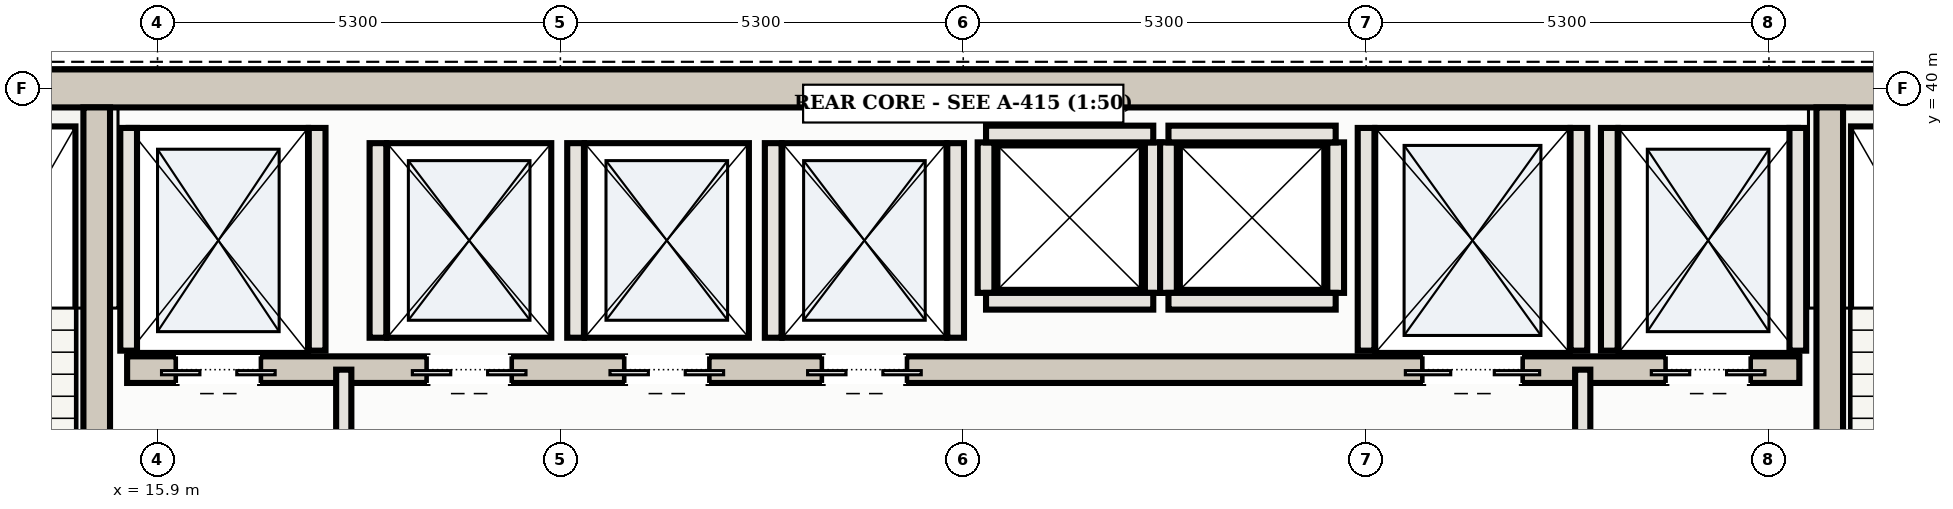
"""IFC4 building model, lengths in metres.
Left out: names, types, materials, properties, quantities, classifications, styles, units other than length and angle.
Written with IfcOpenShell. Run it as: python <this file> out.ifc"""

import sys

from ifc_helpers import new_model, si_unit, direction, frame, frame_2d, origin, place, context, subcontext, project, spatial, rectangle, extrude, element, fill, save


model = new_model("IFC4")
c1 = context("Model", 3, precision=1e-05, world=origin(), true_north=direction((0.0, 1.0)))
c2 = subcontext(c1, "Body", "Model", "MODEL_VIEW")
j1 = project(units=[si_unit("LENGTHUNIT", "METRE"), si_unit("PLANEANGLEUNIT", "RADIAN")], contexts=[c1])
p1 = place(None, origin())
s1 = spatial("IfcSite", under=j1, at=p1, CompositionType="ELEMENT")
p2 = place(p1, origin())
s2 = spatial("IfcBuilding", under=s1, at=p2, CompositionType="ELEMENT")
p3 = place(p2, frame((0.0, 0.0, 266.0)))
s3 = spatial("IfcBuildingStorey", under=s2, at=p3, CompositionType="ELEMENT", Elevation=266.0)
p4 = place(p3, frame((10.35, 40.0, 0.0), z_axis=(0.0, 0.0, 1.0), x_axis=(1.0, 0.0, 0.0)))
e1 = element("IfcWall", 1, at=p4, inside=s3, PredefinedType="SHEAR", context=c2, shape_type="SweptSolid", body=[
    extrude(rectangle(XDim=32.3, YDim=0.5, at=frame_2d((16.15, 0.0))), origin(), (0.0, 0.0, 1.0), 4.52),
])
p5 = place(p3, frame((15.1, 31.1, 0.0), z_axis=(0.0, 0.0, 1.0), x_axis=(0.0, 1.0, 0.0)))
e2 = element("IfcWall", 2, at=p5, inside=s3, PredefinedType="SHEAR", context=c2, shape_type="SweptSolid", body=[
    extrude(rectangle(XDim=8.65, YDim=0.35, at=frame_2d((4.325, 0.0))), origin(), (0.0, 0.0, 1.0), 4.52),
])
p6 = place(p5, frame((0.51, 0.0, 0.0)))
e3 = element("IfcOpeningElement", 3, at=p6, cuts=e2, PredefinedType="OPENING", context=c2, shape_type="SweptSolid", body=[
    extrude(rectangle(XDim=1.15, YDim=2.2, at=frame_2d((0.575, 1.1))), frame((0.0, 0.185, 0.0), z_axis=(0.0, -1.0, 0.0), x_axis=(1.0, 0.0, 0.0)), (0.0, 0.0, 1.0), 0.37),
])
p7 = place(p3, frame((37.9, 31.1, 0.0), z_axis=(0.0, 0.0, 1.0), x_axis=(0.0, 1.0, 0.0)))
e4 = element("IfcWall", 4, at=p7, inside=s3, PredefinedType="SHEAR", context=c2, shape_type="SweptSolid", body=[
    extrude(rectangle(XDim=8.65, YDim=0.35, at=frame_2d((4.325, 0.0))), origin(), (0.0, 0.0, 1.0), 4.52),
])
p8 = place(p7, frame((0.51, 0.0, 0.0)))
e5 = element("IfcOpeningElement", 5, at=p8, cuts=e4, PredefinedType="OPENING", context=c2, shape_type="SweptSolid", body=[
    extrude(rectangle(XDim=1.15, YDim=2.2, at=frame_2d((0.575, 1.1))), frame((0.0, 0.185, 0.0), z_axis=(0.0, -1.0, 0.0), x_axis=(1.0, 0.0, 0.0)), (0.0, 0.0, 1.0), 0.37),
])
p9 = place(p3, frame((15.5, 36.3, 0.0), z_axis=(0.0, 0.0, 1.0), x_axis=(1.0, 0.0, 0.0)))
e6 = element("IfcWall", 6, at=p9, inside=s3, PredefinedType="SHEAR", context=c2, shape_type="SweptSolid", body=[
    extrude(rectangle(XDim=22.0, YDim=0.35, at=frame_2d((11.0, 0.0))), origin(), (0.0, 0.0, 1.0), 4.52),
])
p10 = place(p9, frame((0.65, 0.0, 0.0)))
e7 = element("IfcOpeningElement", 7, at=p10, cuts=e6, PredefinedType="OPENING", context=c2, shape_type="SweptSolid", body=[
    extrude(rectangle(XDim=1.1, YDim=2.15, at=frame_2d((0.55, 1.075))), frame((0.0, 0.185, 0.0), z_axis=(0.0, -1.0, 0.0), x_axis=(1.0, 0.0, 0.0)), (0.0, 0.0, 1.0), 0.37),
])
p11 = place(p9, frame((20.25, 0.0, 0.0)))
e8 = element("IfcOpeningElement", 8, at=p11, cuts=e6, PredefinedType="OPENING", context=c2, shape_type="SweptSolid", body=[
    extrude(rectangle(XDim=1.1, YDim=2.15, at=frame_2d((0.55, 1.075))), frame((0.0, 0.185, 0.0), z_axis=(0.0, -1.0, 0.0), x_axis=(1.0, 0.0, 0.0)), (0.0, 0.0, 1.0), 0.37),
])
p12 = place(p9, frame((17.05, 0.0, 0.0)))
e9 = element("IfcOpeningElement", 9, at=p12, cuts=e6, PredefinedType="OPENING", context=c2, shape_type="SweptSolid", body=[
    extrude(rectangle(XDim=1.3, YDim=2.2, at=frame_2d((0.65, 1.1))), frame((0.0, 0.185, 0.0), z_axis=(0.0, -1.0, 0.0), x_axis=(1.0, 0.0, 0.0)), (0.0, 0.0, 1.0), 0.37),
])
p13 = place(p9, frame((3.95, 0.0, 0.0)))
e10 = element("IfcOpeningElement", 10, at=p13, cuts=e6, PredefinedType="OPENING", context=c2, shape_type="SweptSolid", body=[
    extrude(rectangle(XDim=1.1, YDim=2.15, at=frame_2d((0.55, 1.075))), frame((0.0, 0.185, 0.0), z_axis=(0.0, -1.0, 0.0), x_axis=(1.0, 0.0, 0.0)), (0.0, 0.0, 1.0), 0.37),
])
p14 = place(p9, frame((6.55, 0.0, 0.0)))
e11 = element("IfcOpeningElement", 11, at=p14, cuts=e6, PredefinedType="OPENING", context=c2, shape_type="SweptSolid", body=[
    extrude(rectangle(XDim=1.1, YDim=2.15, at=frame_2d((0.55, 1.075))), frame((0.0, 0.185, 0.0), z_axis=(0.0, -1.0, 0.0), x_axis=(1.0, 0.0, 0.0)), (0.0, 0.0, 1.0), 0.37),
])
p15 = place(p9, frame((9.15, 0.0, 0.0)))
e12 = element("IfcOpeningElement", 12, at=p15, cuts=e6, PredefinedType="OPENING", context=c2, shape_type="SweptSolid", body=[
    extrude(rectangle(XDim=1.1, YDim=2.15, at=frame_2d((0.55, 1.075))), frame((0.0, 0.185, 0.0), z_axis=(0.0, -1.0, 0.0), x_axis=(1.0, 0.0, 0.0)), (0.0, 0.0, 1.0), 0.37),
])
for number, where, z_axis, x_axis in (
    (13, (15.52, 36.55, 0.0), (0.0, 0.0, 1.0), (0.0, 1.0, 0.0)),
    (14, (18.0, 36.55, 0.0), (0.0, 0.0, 1.0), (0.0, 1.0, 0.0)),
    (15, (35.0, 36.55, 0.0), (0.0, 0.0, 1.0), (0.0, 1.0, 0.0)),
    (16, (37.48, 36.55, 0.0), (0.0, 0.0, 1.0), (0.0, 1.0, 0.0)),
    (17, (31.8, 36.55, 0.0), (0.0, 0.0, 1.0), (0.0, 1.0, 0.0)),
    (18, (34.6, 36.55, 0.0), (0.0, 0.0, 1.0), (0.0, 1.0, 0.0)),
):
    element("IfcWall", number, at=place(p3, frame(where, z_axis=z_axis, x_axis=x_axis)), inside=s3, PredefinedType="SOLIDWALL", context=c2, shape_type="SweptSolid", body=[
        extrude(rectangle(XDim=2.93, YDim=0.22, at=frame_2d((1.465, 0.0))), origin(), (0.0, 0.0, 1.0), 4.52),
    ])
for number, where, z_axis, x_axis in (
    (19, (18.8, 36.72, 0.0), (0.0, 0.0, 1.0), (0.0, 1.0, 0.0)),
    (20, (21.4, 36.72, 0.0), (0.0, 0.0, 1.0), (0.0, 1.0, 0.0)),
    (21, (24.0, 36.72, 0.0), (0.0, 0.0, 1.0), (0.0, 1.0, 0.0)),
    (22, (26.4, 36.72, 0.0), (0.0, 0.0, 1.0), (0.0, 1.0, 0.0)),
):
    element("IfcWall", number, at=place(p3, frame(where, z_axis=z_axis, x_axis=x_axis)), inside=s3, PredefinedType="SOLIDWALL", context=c2, shape_type="SweptSolid", body=[
        extrude(rectangle(XDim=2.56, YDim=0.22, at=frame_2d((1.28, 0.0))), origin(), (0.0, 0.0, 1.0), 4.52),
    ])
for number, where, z_axis, x_axis in (
    (23, (26.8, 37.31, 0.0), (0.0, 0.0, 1.0), (0.0, 1.0, 0.0)),
    (24, (29.0, 37.31, 0.0), (0.0, 0.0, 1.0), (0.0, 1.0, 0.0)),
):
    element("IfcWall", number, at=place(p3, frame(where, z_axis=z_axis, x_axis=x_axis)), inside=s3, PredefinedType="SOLIDWALL", context=c2, shape_type="SweptSolid", body=[
        extrude(rectangle(XDim=1.98, YDim=0.22, at=frame_2d((0.99, 0.0))), origin(), (0.0, 0.0, 1.0), 4.52),
    ])
for number, where, z_axis, x_axis in (
    (25, (26.8, 39.4, 0.0), (0.0, 0.0, 1.0), (1.0, 0.0, 0.0)),
    (26, (26.8, 37.2, 0.0), (0.0, 0.0, 1.0), (1.0, 0.0, 0.0)),
):
    element("IfcWall", number, at=place(p3, frame(where, z_axis=z_axis, x_axis=x_axis)), inside=s3, PredefinedType="SOLIDWALL", context=c2, shape_type="SweptSolid", body=[
        extrude(rectangle(XDim=2.2, YDim=0.22, at=frame_2d((1.1, 0.0))), origin(), (0.0, 0.0, 1.0), 4.52),
    ])
for number, where, z_axis, x_axis in (
    (27, (29.2, 37.31, 0.0), (0.0, 0.0, 1.0), (0.0, 1.0, 0.0)),
    (28, (31.4, 37.31, 0.0), (0.0, 0.0, 1.0), (0.0, 1.0, 0.0)),
):
    element("IfcWall", number, at=place(p3, frame(where, z_axis=z_axis, x_axis=x_axis)), inside=s3, PredefinedType="SOLIDWALL", context=c2, shape_type="SweptSolid", body=[
        extrude(rectangle(XDim=1.98, YDim=0.22, at=frame_2d((0.99, 0.0))), origin(), (0.0, 0.0, 1.0), 4.52),
    ])
for number, where, z_axis, x_axis in (
    (29, (29.2, 39.4, 0.0), (0.0, 0.0, 1.0), (1.0, 0.0, 0.0)),
    (30, (29.2, 37.2, 0.0), (0.0, 0.0, 1.0), (1.0, 0.0, 0.0)),
):
    element("IfcWall", number, at=place(p3, frame(where, z_axis=z_axis, x_axis=x_axis)), inside=s3, PredefinedType="SOLIDWALL", context=c2, shape_type="SweptSolid", body=[
        extrude(rectangle(XDim=2.2, YDim=0.22, at=frame_2d((1.1, 0.0))), origin(), (0.0, 0.0, 1.0), 4.52),
    ])
p16 = place(p3, frame((18.35, 31.15, 0.0), z_axis=(0.0, 0.0, 1.0), x_axis=(0.0, 1.0, 0.0)))
e31 = element("IfcWall", 31, at=p16, inside=s3, PredefinedType="PARTITIONING", context=c2, shape_type="SweptSolid", body=[
    extrude(rectangle(XDim=5.15, YDim=0.2, at=frame_2d((2.575, 0.0))), origin(), (0.0, 0.0, 1.0), 4.52),
])
p17 = place(p16, frame((1.875, 0.0, 0.0)))
e32 = element("IfcOpeningElement", 32, at=p17, cuts=e31, PredefinedType="OPENING", context=c2, shape_type="SweptSolid", body=[
    extrude(rectangle(XDim=1.25, YDim=2.2, at=frame_2d((0.625, 1.1))), frame((0.0, 0.11, 0.0), z_axis=(0.0, -1.0, 0.0), x_axis=(1.0, 0.0, 0.0)), (0.0, 0.0, 1.0), 0.22),
])
p18 = place(p3, frame((34.65, 31.15, 0.0), z_axis=(0.0, 0.0, 1.0), x_axis=(0.0, 1.0, 0.0)))
e33 = element("IfcWall", 33, at=p18, inside=s3, PredefinedType="PARTITIONING", context=c2, shape_type="SweptSolid", body=[
    extrude(rectangle(XDim=5.15, YDim=0.2, at=frame_2d((2.575, 0.0))), origin(), (0.0, 0.0, 1.0), 4.52),
])
p19 = place(p18, frame((1.875, 0.0, 0.0)))
e34 = element("IfcOpeningElement", 34, at=p19, cuts=e33, PredefinedType="OPENING", context=c2, shape_type="SweptSolid", body=[
    extrude(rectangle(XDim=1.25, YDim=2.2, at=frame_2d((0.625, 1.1))), frame((0.0, 0.11, 0.0), z_axis=(0.0, -1.0, 0.0), x_axis=(1.0, 0.0, 0.0)), (0.0, 0.0, 1.0), 0.22),
])
p20 = place(p10, frame((1.1, 0.0, 0.0), z_axis=(0.0, 0.0, 1.0), x_axis=(-1.0, 0.0, 0.0)))
e35 = element("IfcDoor", 35, at=p20, inside=s3, OperationType="DOUBLE_DOOR_SLIDING", PredefinedType="DOOR", context=c2, shape_type="SweptSolid", body=[
    extrude(rectangle(XDim=1.1, YDim=2.15, at=frame_2d((0.55, 1.075))), frame((0.0, 0.025, 0.0), z_axis=(0.0, -1.0, 0.0), x_axis=(1.0, 0.0, 0.0)), (0.0, 0.0, 1.0), 0.05),
])
fill(e7, e35)
p21 = place(p11, frame((1.1, 0.0, 0.0), z_axis=(0.0, 0.0, 1.0), x_axis=(-1.0, 0.0, 0.0)))
e36 = element("IfcDoor", 36, at=p21, inside=s3, OperationType="DOUBLE_DOOR_SLIDING", PredefinedType="DOOR", context=c2, shape_type="SweptSolid", body=[
    extrude(rectangle(XDim=1.1, YDim=2.15, at=frame_2d((0.55, 1.075))), frame((0.0, 0.025, 0.0), z_axis=(0.0, -1.0, 0.0), x_axis=(1.0, 0.0, 0.0)), (0.0, 0.0, 1.0), 0.05),
])
fill(e8, e36)
p22 = place(p12, frame((1.3, 0.0, 0.0), z_axis=(0.0, 0.0, 1.0), x_axis=(-1.0, 0.0, 0.0)))
e37 = element("IfcDoor", 37, at=p22, inside=s3, OperationType="DOUBLE_DOOR_SLIDING", PredefinedType="DOOR", context=c2, shape_type="SweptSolid", body=[
    extrude(rectangle(XDim=1.3, YDim=2.2, at=frame_2d((0.65, 1.1))), frame((0.0, 0.025, 0.0), z_axis=(0.0, -1.0, 0.0), x_axis=(1.0, 0.0, 0.0)), (0.0, 0.0, 1.0), 0.05),
])
fill(e9, e37)
p23 = place(p13, frame((1.1, 0.0, 0.0), z_axis=(0.0, 0.0, 1.0), x_axis=(-1.0, 0.0, 0.0)))
e38 = element("IfcDoor", 38, at=p23, inside=s3, OperationType="DOUBLE_DOOR_SLIDING", PredefinedType="DOOR", context=c2, shape_type="SweptSolid", body=[
    extrude(rectangle(XDim=1.1, YDim=2.15, at=frame_2d((0.55, 1.075))), frame((0.0, 0.025, 0.0), z_axis=(0.0, -1.0, 0.0), x_axis=(1.0, 0.0, 0.0)), (0.0, 0.0, 1.0), 0.05),
])
fill(e10, e38)
p24 = place(p14, frame((1.1, 0.0, 0.0), z_axis=(0.0, 0.0, 1.0), x_axis=(-1.0, 0.0, 0.0)))
e39 = element("IfcDoor", 39, at=p24, inside=s3, OperationType="DOUBLE_DOOR_SLIDING", PredefinedType="DOOR", context=c2, shape_type="SweptSolid", body=[
    extrude(rectangle(XDim=1.1, YDim=2.15, at=frame_2d((0.55, 1.075))), frame((0.0, 0.025, 0.0), z_axis=(0.0, -1.0, 0.0), x_axis=(1.0, 0.0, 0.0)), (0.0, 0.0, 1.0), 0.05),
])
fill(e11, e39)
p25 = place(p15, frame((1.1, 0.0, 0.0), z_axis=(0.0, 0.0, 1.0), x_axis=(-1.0, 0.0, 0.0)))
e40 = element("IfcDoor", 40, at=p25, inside=s3, OperationType="DOUBLE_DOOR_SLIDING", PredefinedType="DOOR", context=c2, shape_type="SweptSolid", body=[
    extrude(rectangle(XDim=1.1, YDim=2.15, at=frame_2d((0.55, 1.075))), frame((0.0, 0.025, 0.0), z_axis=(0.0, -1.0, 0.0), x_axis=(1.0, 0.0, 0.0)), (0.0, 0.0, 1.0), 0.05),
])
fill(e12, e40)
save(model, sys.argv[1])
